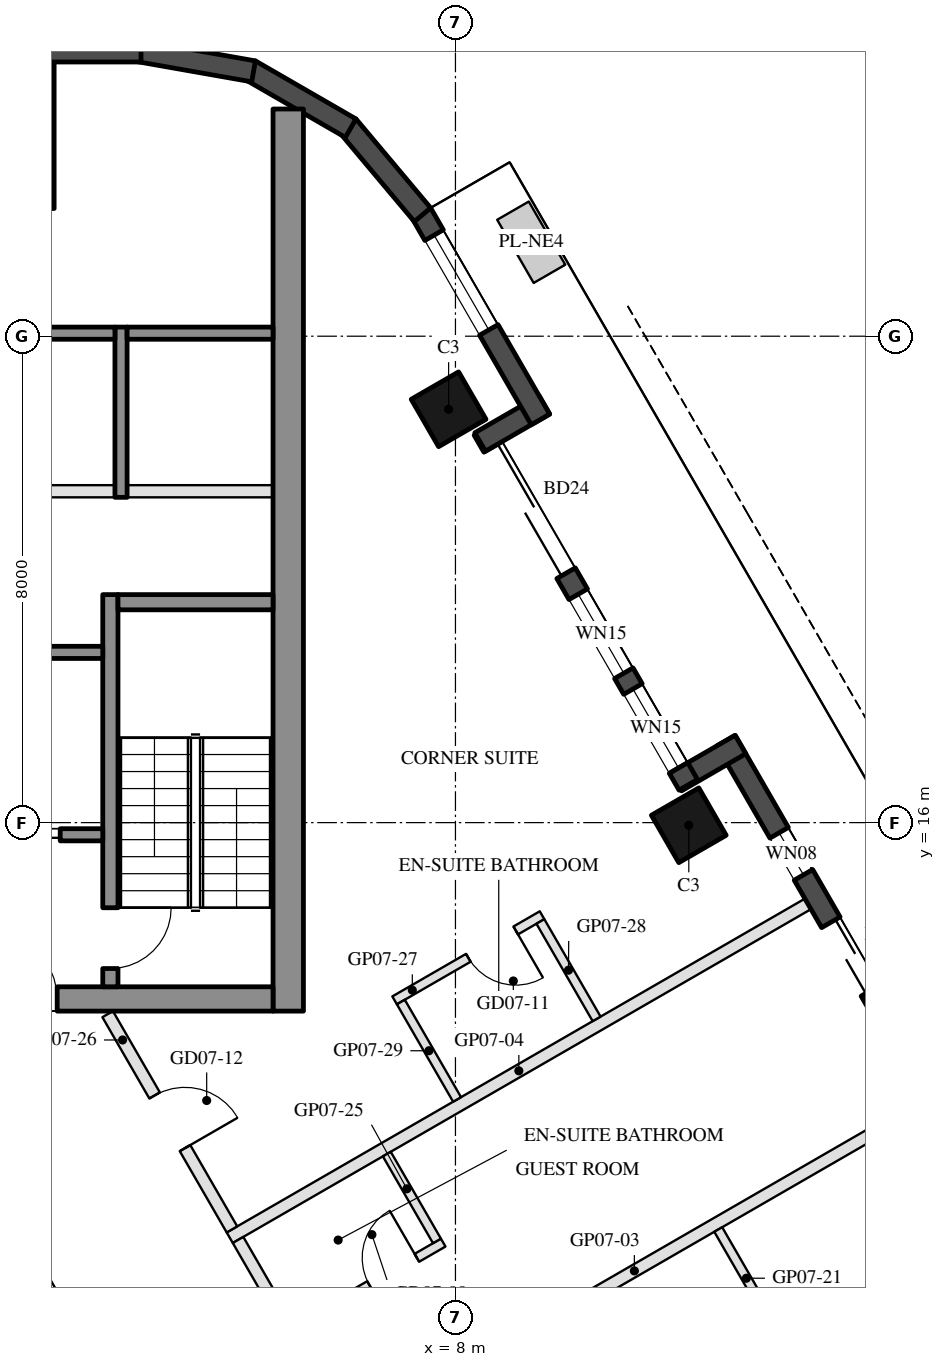
"""IFC4 building model, lengths in metres.
Left out: names, types, materials, properties, quantities, classifications, styles, units other than length and angle.
Written with IfcOpenShell. Run it as: python <this file> out.ifc"""

import sys

from ifc_helpers import new_model, si_unit, direction, frame, frame_2d, origin, origin_2d, place, context, subcontext, project, spatial, rectangle, hollow_rectangle, extrude, element, fill, save


model = new_model("IFC4")
c1 = context("Model", 3, precision=1e-05, world=origin(), true_north=direction((0.0, 1.0)))
c2 = subcontext(c1, "Body", "Model", "MODEL_VIEW")
j1 = project(units=[si_unit("LENGTHUNIT", "METRE"), si_unit("PLANEANGLEUNIT", "RADIAN")], contexts=[c1])
p1 = place(None, origin())
s1 = spatial("IfcSite", under=j1, at=p1, CompositionType="ELEMENT")
p2 = place(p1, origin())
s2 = spatial("IfcBuilding", under=s1, at=p2, CompositionType="ELEMENT")
p3 = place(p2, frame((0.0, 0.0, 94.6)))
s3 = spatial("IfcBuildingStorey", under=s2, at=p3, CompositionType="ELEMENT", Elevation=94.6)
for number, where, z_axis, x_axis in (
    (1, (11.838, 15.957, 0.0), (0.0, 0.0, 1.0), (-0.5, 0.866, 0.0)),
    (2, (7.888, 22.798, 0.0), (0.0, 0.0, 1.0), (-0.5, 0.866, 0.0)),
):
    element("IfcColumn", number, at=place(p3, frame(where, z_axis=z_axis, x_axis=x_axis)), inside=s3, PredefinedType="COLUMN", context=c2, shape_type="SweptSolid", body=[
        extrude(hollow_rectangle(XDim=0.9, YDim=0.9, WallThickness=0.04, at=origin_2d()), origin(), (0.0, 0.0, 1.0), 3.7),
    ])
p4 = place(p3, frame((0.0, 27.3, 0.0), z_axis=(0.0, 0.0, 1.0), x_axis=(1.0, 0.0, 0.0)))
e3 = element("IfcColumn", 3, at=p4, inside=s3, PredefinedType="COLUMN", context=c2, shape_type="SweptSolid", body=[
    extrude(hollow_rectangle(XDim=2.8, YDim=2.4, WallThickness=0.07, at=origin_2d()), origin(), (0.0, 0.0, 1.0), 3.7),
])
p5 = place(p3, frame((17.299, 8.948, 0.0), z_axis=(0.0, 0.0, 1.0), x_axis=(-0.500010041276, 0.866019606374, 0.0)))
e4 = element("IfcWall", 4, at=p5, inside=s3, PredefinedType="SOLIDWALL", context=c2, shape_type="SweptSolid", body=[
    extrude(rectangle(XDim=9.7, YDim=0.35, at=frame_2d((4.85, 0.0))), origin(), (0.0, 0.0, 1.0), 3.55),
])
p6 = place(p5, frame((3.351, 0.0, 0.3)))
e5 = element("IfcOpeningElement", 5, at=p6, cuts=e4, PredefinedType="OPENING", context=c2, shape_type="SweptSolid", body=[
    extrude(rectangle(XDim=0.8, YDim=2.65, at=frame_2d((0.4, 1.325))), frame((0.0, 0.185, 0.0), z_axis=(0.0, -1.0, 0.0), x_axis=(1.0, 0.0, 0.0)), (0.0, 0.0, 1.0), 0.37),
])
p7 = place(p5, frame((4.95, 0.0, 0.0)))
e6 = element("IfcOpeningElement", 6, at=p7, cuts=e4, PredefinedType="OPENING", context=c2, shape_type="SweptSolid", body=[
    extrude(rectangle(XDim=1.3, YDim=2.4, at=frame_2d((0.65, 1.2))), frame((0.0, 0.185, 0.0), z_axis=(0.0, -1.0, 0.0), x_axis=(1.0, 0.0, 0.0)), (0.0, 0.0, 1.0), 0.37),
])
p8 = place(p5, frame((7.15, 0.0, 0.3)))
e7 = element("IfcOpeningElement", 7, at=p8, cuts=e4, PredefinedType="OPENING", context=c2, shape_type="SweptSolid", body=[
    extrude(rectangle(XDim=0.8, YDim=2.65, at=frame_2d((0.4, 1.325))), frame((0.0, 0.185, 0.0), z_axis=(0.0, -1.0, 0.0), x_axis=(1.0, 0.0, 0.0)), (0.0, 0.0, 1.0), 0.37),
])
p9 = place(p3, frame((12.688, 17.284, 0.0), z_axis=(0.0, 0.0, 1.0), x_axis=(-0.865955602162, -0.500120880472, 0.0)))
e8 = element("IfcWall", 8, at=p9, inside=s3, PredefinedType="SOLIDWALL", context=c2, shape_type="SweptSolid", body=[
    extrude(rectangle(XDim=1.22, YDim=0.35, at=frame_2d((0.61, 0.0))), origin(), (0.0, 0.0, 1.0), 3.55),
])
p10 = place(p3, frame((11.829, 16.621, 0.0), z_axis=(0.0, 0.0, 1.0), x_axis=(-0.500003597184, 0.866023326939, 0.0)))
e9 = element("IfcWall", 9, at=p10, inside=s3, PredefinedType="SOLIDWALL", context=c2, shape_type="SweptSolid", body=[
    extrude(rectangle(XDim=6.74, YDim=0.35, at=frame_2d((3.37, 0.0))), origin(), (0.0, 0.0, 1.0), 3.55),
])
p11 = place(p10, frame((4.02, 0.0, 0.0)))
e10 = element("IfcOpeningElement", 10, at=p11, cuts=e9, PredefinedType="OPENING", context=c2, shape_type="SweptSolid", body=[
    extrude(rectangle(XDim=2.4, YDim=2.4, at=frame_2d((1.2, 1.2))), frame((0.0, 0.185, 0.0), z_axis=(0.0, -1.0, 0.0), x_axis=(1.0, 0.0, 0.0)), (0.0, 0.0, 1.0), 0.37),
])
p12 = place(p10, frame((0.32, 0.0, 0.3)))
e11 = element("IfcOpeningElement", 11, at=p12, cuts=e9, PredefinedType="OPENING", context=c2, shape_type="SweptSolid", body=[
    extrude(rectangle(XDim=1.5, YDim=2.65, at=frame_2d((0.75, 1.325))), frame((0.0, 0.185, 0.0), z_axis=(0.0, -1.0, 0.0), x_axis=(1.0, 0.0, 0.0)), (0.0, 0.0, 1.0), 0.37),
])
p13 = place(p10, frame((2.12, 0.0, 0.3)))
e12 = element("IfcOpeningElement", 12, at=p13, cuts=e9, PredefinedType="OPENING", context=c2, shape_type="SweptSolid", body=[
    extrude(rectangle(XDim=1.5, YDim=2.65, at=frame_2d((0.75, 1.325))), frame((0.0, 0.185, 0.0), z_axis=(0.0, -1.0, 0.0), x_axis=(1.0, 0.0, 0.0)), (0.0, 0.0, 1.0), 0.37),
])
p14 = place(p3, frame((8.406, 22.26, 0.0), z_axis=(0.0, 0.0, 1.0), x_axis=(0.865955602162, 0.500120880472, 0.0)))
e13 = element("IfcWall", 13, at=p14, inside=s3, PredefinedType="SOLIDWALL", context=c2, shape_type="SweptSolid", body=[
    extrude(rectangle(XDim=1.22, YDim=0.35, at=frame_2d((0.61, 0.0))), origin(), (0.0, 0.0, 1.0), 3.55),
])
p15 = place(p3, frame((9.398, 22.631, 0.0), z_axis=(0.0, 0.0, 1.0), x_axis=(-0.499954521343, 0.866051659307, 0.0)))
e14 = element("IfcWall", 14, at=p15, inside=s3, PredefinedType="SOLIDWALL", context=c2, shape_type="SweptSolid", body=[
    extrude(rectangle(XDim=3.916, YDim=0.35, at=frame_2d((1.958, 0.0))), origin(), (0.0, 0.0, 1.0), 3.55),
])
p16 = place(p15, frame((1.7, 0.0, 0.3)))
e15 = element("IfcOpeningElement", 15, at=p16, cuts=e14, PredefinedType="OPENING", context=c2, shape_type="SweptSolid", body=[
    extrude(rectangle(XDim=1.8, YDim=2.65, at=frame_2d((0.9, 1.325))), frame((0.0, 0.185, 0.0), z_axis=(0.0, -1.0, 0.0), x_axis=(1.0, 0.0, 0.0)), (0.0, 0.0, 1.0), 0.37),
])
p17 = place(p3, frame((7.458, 25.998, 0.0), z_axis=(0.0, 0.0, 1.0), x_axis=(-0.642808304945, 0.766027077259, 0.0)))
e16 = element("IfcWall", 16, at=p17, inside=s3, PredefinedType="SOLIDWALL", context=c2, shape_type="SweptSolid", body=[
    extrude(rectangle(XDim=1.91, YDim=0.35, at=frame_2d((0.955, 0.0))), origin(), (0.0, 0.0, 1.0), 3.55),
])
for number, where, z_axis, x_axis in (
    (17, (6.277, 27.422, 0.0), (0.0, 0.0, 1.0), (-0.866, 0.5, 0.0)),
    (18, (4.68, 28.356, 0.0), (0.0, 0.0, 1.0), (-0.985, 0.174, 0.0)),
):
    element("IfcWall", number, at=place(p3, frame(where, z_axis=z_axis, x_axis=x_axis)), inside=s3, PredefinedType="SOLIDWALL", context=c2, shape_type="SweptSolid", body=[
        extrude(rectangle(XDim=1.91, YDim=0.35, at=frame_2d((0.955, 0.0))), origin(), (0.0, 0.0, 1.0), 3.55),
    ])
p18 = place(p3, frame((2.829, 28.685, 0.0), z_axis=(0.0, 0.0, 1.0), x_axis=(-1.0, 0.0, 0.0)))
e19 = element("IfcWall", 19, at=p18, inside=s3, PredefinedType="SOLIDWALL", context=c2, shape_type="SweptSolid", body=[
    extrude(rectangle(XDim=5.658, YDim=0.35, at=frame_2d((2.829, 0.0))), origin(), (0.0, 0.0, 1.0), 3.55),
])
p19 = place(p3, frame((5.25, 12.9, 0.0), z_axis=(0.0, 0.0, 1.0), x_axis=(0.0, 1.0, 0.0)))
e20 = element("IfcWall", 20, at=p19, inside=s3, PredefinedType="SHEAR", context=c2, shape_type="SweptSolid", body=[
    extrude(rectangle(XDim=14.837, YDim=0.5, at=frame_2d((7.418, 0.0))), origin(), (0.0, 0.0, 1.0), 3.5),
])
p20 = place(p3, frame((5.0, 13.1, 0.0), z_axis=(0.0, 0.0, 1.0), x_axis=(-1.0, 0.0, 0.0)))
e21 = element("IfcWall", 21, at=p20, inside=s3, PredefinedType="SHEAR", context=c2, shape_type="SweptSolid", body=[
    extrude(rectangle(XDim=10.0, YDim=0.4, at=frame_2d((5.0, 0.0))), origin(), (0.0, 0.0, 1.0), 3.5),
])
p21 = place(p20, frame((3.55, 0.0, 0.0)))
e22 = element("IfcOpeningElement", 22, at=p21, cuts=e21, PredefinedType="OPENING", context=c2, shape_type="SweptSolid", body=[
    extrude(rectangle(XDim=1.1, YDim=2.1, at=frame_2d((0.55, 1.05))), frame((0.0, 0.21, 0.0), z_axis=(0.0, -1.0, 0.0), x_axis=(1.0, 0.0, 0.0)), (0.0, 0.0, 1.0), 0.42),
])
p22 = place(p20, frame((5.85, 0.0, 0.0)))
e23 = element("IfcOpeningElement", 23, at=p22, cuts=e21, PredefinedType="OPENING", context=c2, shape_type="SweptSolid", body=[
    extrude(rectangle(XDim=1.4, YDim=2.1, at=frame_2d((0.7, 1.05))), frame((0.0, 0.21, 0.0), z_axis=(0.0, -1.0, 0.0), x_axis=(1.0, 0.0, 0.0)), (0.0, 0.0, 1.0), 0.42),
])
p23 = place(p3, frame((2.325, 13.3, 0.0), z_axis=(0.0, 0.0, 1.0), x_axis=(0.0, 1.0, 0.0)))
e24 = element("IfcWall", 24, at=p23, inside=s3, PredefinedType="SHEAR", context=c2, shape_type="SweptSolid", body=[
    extrude(rectangle(XDim=6.45, YDim=0.25, at=frame_2d((3.225, 0.0))), origin(), (0.0, 0.0, 1.0), 3.5),
])
p24 = place(p23, frame((0.3, 0.0, 0.0)))
e25 = element("IfcOpeningElement", 25, at=p24, cuts=e24, PredefinedType="OPENING", context=c2, shape_type="SweptSolid", body=[
    extrude(rectangle(XDim=1.0, YDim=2.1, at=frame_2d((0.5, 1.05))), frame((0.0, 0.135, 0.0), z_axis=(0.0, -1.0, 0.0), x_axis=(1.0, 0.0, 0.0)), (0.0, 0.0, 1.0), 0.27),
])
p25 = place(p3, frame((5.0, 19.625, 0.0), z_axis=(0.0, 0.0, 1.0), x_axis=(-1.0, 0.0, 0.0)))
e26 = element("IfcWall", 26, at=p25, inside=s3, PredefinedType="SHEAR", context=c2, shape_type="SweptSolid", body=[
    extrude(rectangle(XDim=2.55, YDim=0.25, at=frame_2d((1.275, 0.0))), origin(), (0.0, 0.0, 1.0), 3.5),
])
p26 = place(p3, frame((2.2, 18.8, 0.0), z_axis=(0.0, 0.0, 1.0), x_axis=(-1.0, 0.0, 0.0)))
e27 = element("IfcWall", 27, at=p26, inside=s3, PredefinedType="SHEAR", context=c2, shape_type="SweptSolid", body=[
    extrude(rectangle(XDim=2.8, YDim=0.2, at=frame_2d((1.4, 0.0))), origin(), (0.0, 0.0, 1.0), 3.5),
])
p27 = place(p3, frame((2.2, 15.8, 0.0), z_axis=(0.0, 0.0, 1.0), x_axis=(-1.0, 0.0, 0.0)))
e28 = element("IfcWall", 28, at=p27, inside=s3, PredefinedType="SHEAR", context=c2, shape_type="SweptSolid", body=[
    extrude(rectangle(XDim=2.8, YDim=0.2, at=frame_2d((1.4, 0.0))), origin(), (0.0, 0.0, 1.0), 3.5),
])
p28 = place(p27, frame((0.7, 0.0, 0.0)))
e29 = element("IfcOpeningElement", 29, at=p28, cuts=e28, PredefinedType="OPENING", context=c2, shape_type="SweptSolid", body=[
    extrude(rectangle(XDim=1.2, YDim=2.1, at=frame_2d((0.6, 1.05))), frame((0.0, 0.11, 0.0), z_axis=(0.0, -1.0, 0.0), x_axis=(1.0, 0.0, 0.0)), (0.0, 0.0, 1.0), 0.22),
])
p29 = place(p3, frame((2.5, 21.35, 0.0), z_axis=(0.0, 0.0, 1.0), x_axis=(0.0, 1.0, 0.0)))
e30 = element("IfcWall", 30, at=p29, inside=s3, PredefinedType="SHEAR", context=c2, shape_type="SweptSolid", body=[
    extrude(rectangle(XDim=2.8, YDim=0.2, at=frame_2d((1.4, 0.0))), origin(), (0.0, 0.0, 1.0), 3.5),
])
p30 = place(p3, frame((5.0, 24.05, 0.0), z_axis=(0.0, 0.0, 1.0), x_axis=(-1.0, 0.0, 0.0)))
e31 = element("IfcWall", 31, at=p30, inside=s3, PredefinedType="SHEAR", context=c2, shape_type="SweptSolid", body=[
    extrude(rectangle(XDim=2.4, YDim=0.2, at=frame_2d((1.2, 0.0))), origin(), (0.0, 0.0, 1.0), 3.5),
])
p31 = place(p3, frame((2.4, 24.05, 0.0), z_axis=(0.0, 0.0, 1.0), x_axis=(-1.0, 0.0, 0.0)))
e32 = element("IfcWall", 32, at=p31, inside=s3, PredefinedType="SHEAR", context=c2, shape_type="SweptSolid", body=[
    extrude(rectangle(XDim=2.8, YDim=0.2, at=frame_2d((1.4, 0.0))), origin(), (0.0, 0.0, 1.0), 3.5),
])
p32 = place(p3, frame((5.0, 21.45, 0.0), z_axis=(0.0, 0.0, 1.0), x_axis=(-1.0, 0.0, 0.0)))
e33 = element("IfcWall", 33, at=p32, inside=s3, PredefinedType="PARTITIONING", context=c2, shape_type="SweptSolid", body=[
    extrude(rectangle(XDim=2.4, YDim=0.2, at=frame_2d((1.2, 0.0))), origin(), (0.0, 0.0, 1.0), 3.5),
])
p33 = place(p3, frame((2.4, 21.45, 0.0), z_axis=(0.0, 0.0, 1.0), x_axis=(-1.0, 0.0, 0.0)))
e34 = element("IfcWall", 34, at=p33, inside=s3, PredefinedType="PARTITIONING", context=c2, shape_type="SweptSolid", body=[
    extrude(rectangle(XDim=2.8, YDim=0.2, at=frame_2d((1.4, 0.0))), origin(), (0.0, 0.0, 1.0), 3.5),
])
for number, where, z_axis, x_axis in (
    (35, (15.697, 11.372, 0.0), (0.0, 0.0, 1.0), (-0.866, -0.5, 0.0)),
    (36, (13.797, 14.663, 0.0), (0.0, 0.0, 1.0), (-0.866, -0.5, 0.0)),
):
    element("IfcWall", number, at=place(p3, frame(where, z_axis=z_axis, x_axis=x_axis)), inside=s3, PredefinedType="PARTITIONING", context=c2, shape_type="SweptSolid", body=[
        extrude(rectangle(XDim=10.98, YDim=0.2, at=frame_2d((5.49, 0.0))), origin(), (0.0, 0.0, 1.0), 2.96),
    ])
p34 = place(p3, frame((13.247, 7.706, 0.0), z_axis=(0.0, 0.0, 1.0), x_axis=(-0.500042316284, 0.866000971088, 0.0)))
e37 = element("IfcWall", 37, at=p34, inside=s3, PredefinedType="PARTITIONING", context=c2, shape_type="SweptSolid", body=[
    extrude(rectangle(XDim=1.85, YDim=0.15, at=frame_2d((0.925, 0.0))), origin(), (0.0, 0.0, 1.0), 2.95),
])
p35 = place(p3, frame((4.425, 9.136, 0.0), z_axis=(0.0, 0.0, 1.0), x_axis=(0.500041424909, -0.866001485781, 0.0)))
e38 = element("IfcWall", 38, at=p35, inside=s3, PredefinedType="PARTITIONING", context=c2, shape_type="SweptSolid", body=[
    extrude(rectangle(XDim=3.6, YDim=0.2, at=frame_2d((1.8, 0.0))), origin(), (0.0, 0.0, 1.0), 2.95),
])
p36 = place(p35, frame((2.2, 0.0, 0.0)))
e39 = element("IfcOpeningElement", 39, at=p36, cuts=e38, PredefinedType="OPENING", context=c2, shape_type="SweptSolid", body=[
    extrude(rectangle(XDim=1.0, YDim=2.1, at=frame_2d((0.5, 1.05))), frame((0.0, 0.11, 0.0), z_axis=(0.0, -1.0, 0.0), x_axis=(1.0, 0.0, 0.0)), (0.0, 0.0, 1.0), 0.22),
])
p37 = place(p3, frame((5.374, 7.692, 0.0), z_axis=(0.0, 0.0, 1.0), x_axis=(0.865996816683, 0.500049511043, 0.0)))
e40 = element("IfcWall", 40, at=p37, inside=s3, PredefinedType="PARTITIONING", context=c2, shape_type="SweptSolid", body=[
    extrude(rectangle(XDim=2.8, YDim=0.15, at=frame_2d((1.4, 0.0))), origin(), (0.0, 0.0, 1.0), 2.95),
])
p38 = place(p37, frame((1.4, 0.0, 0.0)))
e41 = element("IfcOpeningElement", 41, at=p38, cuts=e40, PredefinedType="OPENING", context=c2, shape_type="SweptSolid", body=[
    extrude(rectangle(XDim=0.9, YDim=2.1, at=frame_2d((0.45, 1.05))), frame((0.0, 0.085, 0.0), z_axis=(0.0, -1.0, 0.0), x_axis=(1.0, 0.0, 0.0)), (0.0, 0.0, 1.0), 0.17),
])
p39 = place(p3, frame((7.696, 9.12, 0.0), z_axis=(0.0, 0.0, 1.0), x_axis=(-0.499974350878, 0.866040211805, 0.0)))
e42 = element("IfcWall", 42, at=p39, inside=s3, PredefinedType="PARTITIONING", context=c2, shape_type="SweptSolid", body=[
    extrude(rectangle(XDim=1.65, YDim=0.15, at=frame_2d((0.825, 0.0))), origin(), (0.0, 0.0, 1.0), 2.95),
])
p40 = place(p3, frame((2.281, 12.85, 0.0), z_axis=(0.0, 0.0, 1.0), x_axis=(0.500011931275, -0.86601851515, 0.0)))
e43 = element("IfcWall", 43, at=p40, inside=s3, PredefinedType="PARTITIONING", context=c2, shape_type="SweptSolid", body=[
    extrude(rectangle(XDim=4.088, YDim=0.2, at=frame_2d((2.044, 0.0))), origin(), (0.0, 0.0, 1.0), 2.95),
])
p41 = place(p40, frame((1.544, 0.0, 0.0)))
e44 = element("IfcOpeningElement", 44, at=p41, cuts=e43, PredefinedType="OPENING", context=c2, shape_type="SweptSolid", body=[
    extrude(rectangle(XDim=1.0, YDim=2.1, at=frame_2d((0.5, 1.05))), frame((0.0, 0.11, 0.0), z_axis=(0.0, -1.0, 0.0), x_axis=(1.0, 0.0, 0.0)), (0.0, 0.0, 1.0), 0.22),
])
p42 = place(p3, frame((9.424, 14.477, 0.0), z_axis=(0.0, 0.0, 1.0), x_axis=(-0.866034573852, -0.49998411664, 0.0)))
e45 = element("IfcWall", 45, at=p42, inside=s3, PredefinedType="PARTITIONING", context=c2, shape_type="SweptSolid", body=[
    extrude(rectangle(XDim=2.8, YDim=0.15, at=frame_2d((1.4, 0.0))), origin(), (0.0, 0.0, 1.0), 2.95),
])
p43 = place(p42, frame((0.5, 0.0, 0.0)))
e46 = element("IfcOpeningElement", 46, at=p43, cuts=e45, PredefinedType="OPENING", context=c2, shape_type="SweptSolid", body=[
    extrude(rectangle(XDim=0.9, YDim=2.1, at=frame_2d((0.45, 1.05))), frame((0.0, 0.085, 0.0), z_axis=(0.0, -1.0, 0.0), x_axis=(1.0, 0.0, 0.0)), (0.0, 0.0, 1.0), 0.17),
])
for number, where, z_axis, x_axis in (
    (47, (10.322, 12.772, 0.0), (0.0, 0.0, 1.0), (-0.5, 0.866, 0.0)),
    (48, (8.027, 11.447, 0.0), (0.0, 0.0, 1.0), (-0.5, 0.866, 0.0)),
):
    element("IfcWall", number, at=place(p3, frame(where, z_axis=z_axis, x_axis=x_axis)), inside=s3, PredefinedType="PARTITIONING", context=c2, shape_type="SweptSolid", body=[
        extrude(rectangle(XDim=1.85, YDim=0.15, at=frame_2d((0.925, 0.0))), origin(), (0.0, 0.0, 1.0), 3.55),
    ])
p44 = place(p7, frame((1.3, 0.0, 0.0), z_axis=(0.0, 0.0, 1.0), x_axis=(-1.0, 0.0, 0.0)))
e49 = element("IfcDoor", 49, at=p44, inside=s3, OperationType="SLIDING_TO_LEFT", PredefinedType="DOOR", context=c2, shape_type="SweptSolid", body=[
    extrude(rectangle(XDim=1.3, YDim=2.4, at=frame_2d((0.65, 1.2))), frame((0.0, 0.025, 0.0), z_axis=(0.0, -1.0, 0.0), x_axis=(1.0, 0.0, 0.0)), (0.0, 0.0, 1.0), 0.05),
])
fill(e6, e49)
p45 = place(p8, origin())
e50 = element("IfcWindow", 50, at=p45, inside=s3, PartitioningType="SINGLE_PANEL", PredefinedType="WINDOW", context=c2, shape_type="SweptSolid", body=[
    extrude(rectangle(XDim=0.8, YDim=2.65, at=frame_2d((0.4, 1.325))), frame((0.0, 0.03, 0.0), z_axis=(0.0, -1.0, 0.0), x_axis=(1.0, 0.0, 0.0)), (0.0, 0.0, 1.0), 0.06),
])
fill(e7, e50)
p46 = place(p11, frame((2.4, 0.0, 0.0), z_axis=(0.0, 0.0, 1.0), x_axis=(-1.0, 0.0, 0.0)))
e51 = element("IfcDoor", 51, at=p46, inside=s3, OperationType="SLIDING_TO_LEFT", PredefinedType="DOOR", context=c2, shape_type="SweptSolid", body=[
    extrude(rectangle(XDim=2.4, YDim=2.4, at=frame_2d((1.2, 1.2))), frame((0.0, 0.025, 0.0), z_axis=(0.0, -1.0, 0.0), x_axis=(1.0, 0.0, 0.0)), (0.0, 0.0, 1.0), 0.05),
])
fill(e10, e51)
p47 = place(p12, origin())
e52 = element("IfcWindow", 52, at=p47, inside=s3, PartitioningType="SINGLE_PANEL", PredefinedType="WINDOW", context=c2, shape_type="SweptSolid", body=[
    extrude(rectangle(XDim=1.5, YDim=2.65, at=frame_2d((0.75, 1.325))), frame((0.0, 0.03, 0.0), z_axis=(0.0, -1.0, 0.0), x_axis=(1.0, 0.0, 0.0)), (0.0, 0.0, 1.0), 0.06),
])
fill(e11, e52)
p48 = place(p13, origin())
e53 = element("IfcWindow", 53, at=p48, inside=s3, PartitioningType="SINGLE_PANEL", PredefinedType="WINDOW", context=c2, shape_type="SweptSolid", body=[
    extrude(rectangle(XDim=1.5, YDim=2.65, at=frame_2d((0.75, 1.325))), frame((0.0, 0.03, 0.0), z_axis=(0.0, -1.0, 0.0), x_axis=(1.0, 0.0, 0.0)), (0.0, 0.0, 1.0), 0.06),
])
fill(e12, e53)
p49 = place(p16, origin())
e54 = element("IfcWindow", 54, at=p49, inside=s3, PartitioningType="SINGLE_PANEL", PredefinedType="WINDOW", context=c2, shape_type="SweptSolid", body=[
    extrude(rectangle(XDim=1.8, YDim=2.65, at=frame_2d((0.9, 1.325))), frame((0.0, 0.03, 0.0), z_axis=(0.0, -1.0, 0.0), x_axis=(1.0, 0.0, 0.0)), (0.0, 0.0, 1.0), 0.06),
])
fill(e15, e54)
p50 = place(p28, origin())
e55 = element("IfcDoor", 55, at=p50, inside=s3, OperationType="DOUBLE_DOOR_SLIDING", PredefinedType="DOOR", context=c2, shape_type="SweptSolid", body=[
    extrude(rectangle(XDim=1.2, YDim=2.1, at=frame_2d((0.6, 1.05))), frame((0.0, 0.025, 0.0), z_axis=(0.0, -1.0, 0.0), x_axis=(1.0, 0.0, 0.0)), (0.0, 0.0, 1.0), 0.05),
])
fill(e29, e55)
p51 = place(p21, frame((1.1, 0.0, 0.0), z_axis=(0.0, 0.0, 1.0), x_axis=(-1.0, 0.0, 0.0)))
e56 = element("IfcDoor", 56, at=p51, inside=s3, OperationType="SINGLE_SWING_LEFT", PredefinedType="DOOR", context=c2, shape_type="SweptSolid", body=[
    extrude(rectangle(XDim=1.1, YDim=2.1, at=frame_2d((0.55, 1.05))), frame((0.0, 0.025, 0.0), z_axis=(0.0, -1.0, 0.0), x_axis=(1.0, 0.0, 0.0)), (0.0, 0.0, 1.0), 0.05),
])
fill(e22, e56)
p52 = place(p24, frame((1.0, 0.0, 0.0), z_axis=(0.0, 0.0, 1.0), x_axis=(-1.0, 0.0, 0.0)))
e57 = element("IfcDoor", 57, at=p52, inside=s3, OperationType="SINGLE_SWING_LEFT", PredefinedType="DOOR", context=c2, shape_type="SweptSolid", body=[
    extrude(rectangle(XDim=1.0, YDim=2.1, at=frame_2d((0.5, 1.05))), frame((0.0, 0.025, 0.0), z_axis=(0.0, -1.0, 0.0), x_axis=(1.0, 0.0, 0.0)), (0.0, 0.0, 1.0), 0.05),
])
fill(e25, e57)
p53 = place(p38, origin())
e58 = element("IfcDoor", 58, at=p53, inside=s3, OperationType="SINGLE_SWING_RIGHT", PredefinedType="DOOR", context=c2, shape_type="SweptSolid", body=[
    extrude(rectangle(XDim=0.9, YDim=2.1, at=frame_2d((0.45, 1.05))), frame((0.0, 0.025, 0.0), z_axis=(0.0, -1.0, 0.0), x_axis=(1.0, 0.0, 0.0)), (0.0, 0.0, 1.0), 0.05),
])
fill(e41, e58)
p54 = place(p43, origin())
e59 = element("IfcDoor", 59, at=p54, inside=s3, OperationType="SINGLE_SWING_LEFT", PredefinedType="DOOR", context=c2, shape_type="SweptSolid", body=[
    extrude(rectangle(XDim=0.9, YDim=2.1, at=frame_2d((0.45, 1.05))), frame((0.0, 0.025, 0.0), z_axis=(0.0, -1.0, 0.0), x_axis=(1.0, 0.0, 0.0)), (0.0, 0.0, 1.0), 0.05),
])
fill(e46, e59)
p55 = place(p41, origin())
e60 = element("IfcDoor", 60, at=p55, inside=s3, OperationType="SINGLE_SWING_RIGHT", PredefinedType="DOOR", context=c2, shape_type="SweptSolid", body=[
    extrude(rectangle(XDim=1.0, YDim=2.1, at=frame_2d((0.5, 1.05))), frame((0.0, 0.025, 0.0), z_axis=(0.0, -1.0, 0.0), x_axis=(1.0, 0.0, 0.0)), (0.0, 0.0, 1.0), 0.05),
])
fill(e44, e60)
save(model, sys.argv[1])
